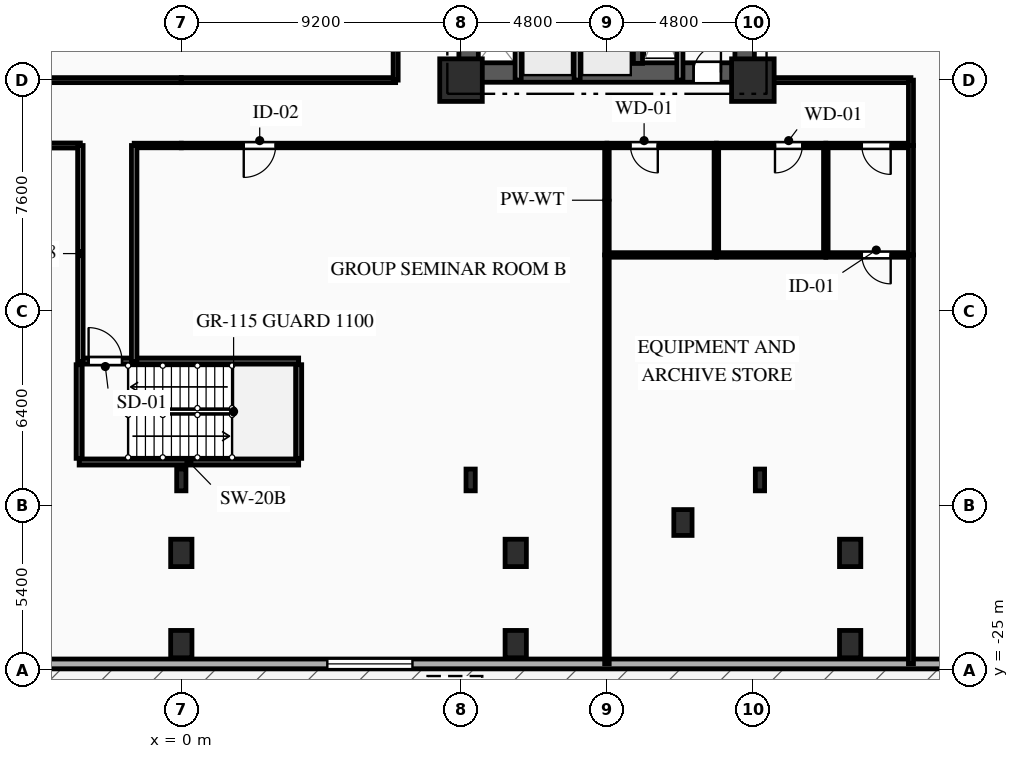
"""IFC4 building model, lengths in metres.
Left out: names, types, materials, properties, quantities, classifications, styles, units other than length and angle.
Written with IfcOpenShell. Run it as: python <this file> out.ifc"""

import sys

from ifc_helpers import new_model, si_unit, direction, frame, frame_2d, origin, origin_2d, place, context, subcontext, project, spatial, rectangle, i_section, extrude, element, fill, save


model = new_model("IFC4")
c1 = context("Model", 3, precision=1e-05, world=origin(), true_north=direction((0.0, 1.0)))
c2 = subcontext(c1, "Body", "Model", "MODEL_VIEW")
j1 = project(units=[si_unit("LENGTHUNIT", "METRE"), si_unit("PLANEANGLEUNIT", "RADIAN")], contexts=[c1])
p1 = place(None, origin())
s1 = spatial("IfcSite", under=j1, at=p1, CompositionType="ELEMENT")
p2 = place(p1, origin())
s2 = spatial("IfcBuilding", under=s1, at=p2, CompositionType="ELEMENT")
p3 = place(p2, frame((0.0, 0.0, 4.5)))
s3 = spatial("IfcBuildingStorey", under=s2, at=p3, CompositionType="ELEMENT", Elevation=4.5)
for number, where, z_axis, x_axis in (
    (1, (9.2, -5.6, 0.0), (0.0, 0.0, 1.0), (1.0, 0.0, 0.0)),
    (2, (18.8, -5.6, 0.0), (0.0, 0.0, 1.0), (1.0, 0.0, 0.0)),
):
    element("IfcColumn", number, at=place(p3, frame(where, z_axis=z_axis, x_axis=x_axis)), inside=s3, PredefinedType="COLUMN", context=c2, shape_type="SweptSolid", body=[
        extrude(rectangle(XDim=1.4, YDim=1.4, at=origin_2d()), origin(), (0.0, 0.0, 1.0), 4.5),
    ])
for number, where, z_axis, x_axis in (
    (3, (0.0, -21.15, 0.0), (0.0, 0.0, 1.0), (1.0, 0.0, 0.0)),
    (4, (11.0, -21.15, 0.0), (0.0, 0.0, 1.0), (1.0, 0.0, 0.0)),
    (5, (22.0, -21.15, 0.0), (0.0, 0.0, 1.0), (1.0, 0.0, 0.0)),
    (6, (0.0, -24.15, 0.0), (0.0, 0.0, 1.0), (1.0, 0.0, 0.0)),
    (7, (11.0, -24.15, 0.0), (0.0, 0.0, 1.0), (1.0, 0.0, 0.0)),
    (8, (22.0, -24.15, 0.0), (0.0, 0.0, 1.0), (1.0, 0.0, 0.0)),
):
    element("IfcColumn", number, at=place(p3, frame(where, z_axis=z_axis, x_axis=x_axis)), inside=s3, PredefinedType="COLUMN", context=c2, shape_type="SweptSolid", body=[
        extrude(rectangle(XDim=0.7, YDim=0.9, at=origin_2d()), origin(), (0.0, 0.0, 1.0), 4.5),
    ])
p4 = place(p3, frame((16.5, -20.15, 0.0), z_axis=(0.0, 0.0, 1.0), x_axis=(1.0, 0.0, 0.0)))
e9 = element("IfcColumn", 9, at=p4, inside=s3, PredefinedType="PILASTER", context=c2, shape_type="SweptSolid", body=[
    extrude(rectangle(XDim=0.6, YDim=0.85, at=origin_2d()), origin(), (0.0, 0.0, 1.0), 4.5),
])
for number, where, z_axis, x_axis in (
    (10, (0.0, -18.75, 0.0), (0.0, 0.0, 1.0), (1.0, 0.0, 0.0)),
    (11, (9.517, -18.75, 0.0), (0.0, 0.0, 1.0), (1.0, 0.0, 0.0)),
    (12, (19.033, -18.75, 0.0), (0.0, 0.0, 1.0), (1.0, 0.0, 0.0)),
):
    element("IfcColumn", number, at=place(p3, frame(where, z_axis=z_axis, x_axis=x_axis)), inside=s3, PredefinedType="COLUMN", context=c2, shape_type="SweptSolid", body=[
        extrude(i_section(OverallWidth=0.304, OverallDepth=0.716, WebThickness=0.021, FlangeThickness=0.04, FilletRadius=0.027, at=origin_2d()), origin(), (0.0, 0.0, 1.0), 4.5),
    ])
p5 = place(p3, frame((38.3, -24.8, 0.0), z_axis=(0.0, 0.0, 1.0), x_axis=(-1.0, 0.0, 0.0)))
e13 = element("IfcWall", 13, at=p5, inside=s3, PredefinedType="SOLIDWALL", context=c2, shape_type="SweptSolid", body=[
    extrude(rectangle(XDim=76.6, YDim=0.32, at=frame_2d((38.3, 0.0))), origin(), (0.0, 0.0, 1.0), 4.17),
])
p6 = place(p5, frame((6.004, 0.0, 0.85)))
e14 = element("IfcOpeningElement", 14, at=p6, cuts=e13, PredefinedType="OPENING", context=c2, shape_type="SweptSolid", body=[
    extrude(rectangle(XDim=2.8, YDim=2.4, at=frame_2d((1.4, 1.2))), frame((0.0, 0.17, 0.0), z_axis=(0.0, -1.0, 0.0), x_axis=(1.0, 0.0, 0.0)), (0.0, 0.0, 1.0), 0.34),
])
p7 = place(p5, frame((30.697, 0.0, 0.85)))
e15 = element("IfcOpeningElement", 15, at=p7, cuts=e13, PredefinedType="OPENING", context=c2, shape_type="SweptSolid", body=[
    extrude(rectangle(XDim=2.8, YDim=2.4, at=frame_2d((1.4, 1.2))), frame((0.0, 0.17, 0.0), z_axis=(0.0, -1.0, 0.0), x_axis=(1.0, 0.0, 0.0)), (0.0, 0.0, 1.0), 0.34),
])
p8 = place(p5, frame((50.587, 0.0, 0.85)))
e16 = element("IfcOpeningElement", 16, at=p8, cuts=e13, PredefinedType="OPENING", context=c2, shape_type="SweptSolid", body=[
    extrude(rectangle(XDim=2.8, YDim=2.4, at=frame_2d((1.4, 1.2))), frame((0.0, 0.17, 0.0), z_axis=(0.0, -1.0, 0.0), x_axis=(1.0, 0.0, 0.0)), (0.0, 0.0, 1.0), 0.34),
])
p9 = place(p5, frame((67.876, 0.0, 0.85)))
e17 = element("IfcOpeningElement", 17, at=p9, cuts=e13, PredefinedType="OPENING", context=c2, shape_type="SweptSolid", body=[
    extrude(rectangle(XDim=2.8, YDim=2.4, at=frame_2d((1.4, 1.2))), frame((0.0, 0.17, 0.0), z_axis=(0.0, -1.0, 0.0), x_axis=(1.0, 0.0, 0.0)), (0.0, 0.0, 1.0), 0.34),
])
p10 = place(p3, frame((9.2, -5.35, 0.0), z_axis=(0.0, 0.0, 1.0), x_axis=(1.0, 0.0, 0.0)))
e18 = element("IfcWall", 18, at=p10, inside=s3, PredefinedType="SHEAR", context=c2, shape_type="SweptSolid", body=[
    extrude(rectangle(XDim=9.6, YDim=0.64, at=frame_2d((4.8, 0.0))), origin(), (0.0, 0.0, 1.0), 4.17),
])
p11 = place(p10, frame((7.65, 0.0, 0.0)))
e19 = element("IfcOpeningElement", 19, at=p11, cuts=e18, PredefinedType="OPENING", context=c2, shape_type="SweptSolid", body=[
    extrude(rectangle(XDim=0.9, YDim=2.1, at=frame_2d((0.45, 1.05))), frame((0.0, 0.33, 0.0), z_axis=(0.0, -1.0, 0.0), x_axis=(1.0, 0.0, 0.0)), (0.0, 0.0, 1.0), 0.66),
])
p12 = place(p3, frame((9.45, -5.05, 0.0), z_axis=(0.0, 0.0, 1.0), x_axis=(0.0, 1.0, 0.0)))
e20 = element("IfcWall", 20, at=p12, inside=s3, PredefinedType="SHEAR", context=c2, shape_type="SweptSolid", body=[
    extrude(rectangle(XDim=10.1, YDim=0.64, at=frame_2d((5.05, 0.0))), origin(), (0.0, 0.0, 1.0), 4.17),
])
p13 = place(p12, frame((7.15, 0.0, 0.0)))
e21 = element("IfcOpeningElement", 21, at=p13, cuts=e20, PredefinedType="OPENING", context=c2, shape_type="SweptSolid", body=[
    extrude(rectangle(XDim=0.9, YDim=2.1, at=frame_2d((0.45, 1.05))), frame((0.0, 0.33, 0.0), z_axis=(0.0, -1.0, 0.0), x_axis=(1.0, 0.0, 0.0)), (0.0, 0.0, 1.0), 0.66),
])
p14 = place(p12, frame((2.4, 0.0, 0.0)))
e22 = element("IfcOpeningElement", 22, at=p14, cuts=e20, PredefinedType="OPENING", context=c2, shape_type="SweptSolid", body=[
    extrude(rectangle(XDim=1.2, YDim=2.15, at=frame_2d((0.6, 1.075))), frame((0.0, 0.33, 0.0), z_axis=(0.0, -1.0, 0.0), x_axis=(1.0, 0.0, 0.0)), (0.0, 0.0, 1.0), 0.66),
])
p15 = place(p3, frame((18.53, -5.05, 0.0), z_axis=(0.0, 0.0, 1.0), x_axis=(0.0, 1.0, 0.0)))
e23 = element("IfcWall", 23, at=p15, inside=s3, PredefinedType="SHEAR", context=c2, shape_type="SweptSolid", body=[
    extrude(rectangle(XDim=10.1, YDim=0.64, at=frame_2d((5.05, 0.0))), origin(), (0.0, 0.0, 1.0), 4.17),
])
p16 = place(p3, frame((15.02, -5.05, 0.0), z_axis=(0.0, 0.0, 1.0), x_axis=(0.0, 1.0, 0.0)))
e24 = element("IfcWall", 24, at=p16, inside=s3, PredefinedType="SHEAR", context=c2, shape_type="SweptSolid", body=[
    extrude(rectangle(XDim=10.1, YDim=0.3, at=frame_2d((5.05, 0.0))), origin(), (0.0, 0.0, 1.0), 4.17),
])
p17 = place(p3, frame((-3.36, -14.84, 0.0), z_axis=(0.0, 0.0, 1.0), x_axis=(1.0, 0.0, 0.0)))
e25 = element("IfcWall", 25, at=p17, inside=s3, PredefinedType="SHEAR", context=c2, shape_type="SweptSolid", body=[
    extrude(rectangle(XDim=7.22, YDim=0.2, at=frame_2d((3.61, 0.0))), origin(), (0.0, 0.0, 1.0), 4.17),
])
p18 = place(p17, frame((0.31, 0.0, 0.0)))
e26 = element("IfcOpeningElement", 26, at=p18, cuts=e25, PredefinedType="OPENING", context=c2, shape_type="SweptSolid", body=[
    extrude(rectangle(XDim=1.1, YDim=2.15, at=frame_2d((0.55, 1.075))), frame((0.0, 0.11, 0.0), z_axis=(0.0, -1.0, 0.0), x_axis=(1.0, 0.0, 0.0)), (0.0, 0.0, 1.0), 0.22),
])
p19 = place(p3, frame((-3.36, -18.16, 0.0), z_axis=(0.0, 0.0, 1.0), x_axis=(1.0, 0.0, 0.0)))
e27 = element("IfcWall", 27, at=p19, inside=s3, PredefinedType="SHEAR", context=c2, shape_type="SweptSolid", body=[
    extrude(rectangle(XDim=7.22, YDim=0.2, at=frame_2d((3.61, 0.0))), origin(), (0.0, 0.0, 1.0), 4.17),
])
for number, where, z_axis, x_axis in (
    (28, (-3.36, -18.04, 0.0), (0.0, 0.0, 1.0), (0.0, 1.0, 0.0)),
    (29, (3.86, -18.04, 0.0), (0.0, 0.0, 1.0), (0.0, 1.0, 0.0)),
):
    element("IfcWall", number, at=place(p3, frame(where, z_axis=z_axis, x_axis=x_axis)), inside=s3, PredefinedType="SHEAR", context=c2, shape_type="SweptSolid", body=[
        extrude(rectangle(XDim=3.08, YDim=0.2, at=frame_2d((1.54, 0.0))), origin(), (0.0, 0.0, 1.0), 4.17),
    ])
p20 = place(p3, frame((16.4, -2.11, 0.0), z_axis=(0.0, 0.0, 1.0), x_axis=(0.0, -1.0, 0.0)))
e30 = element("IfcWall", 30, at=p20, inside=s3, PredefinedType="PARTITIONING", context=c2, shape_type="SweptSolid", body=[
    extrude(rectangle(XDim=3.49, YDim=0.2, at=frame_2d((1.745, 0.0))), origin(), (0.0, 0.0, 1.0), 4.17),
])
for number, where, z_axis, x_axis in (
    (31, (11.08, -5.6, 0.0), (0.0, 0.0, 1.0), (0.0, 1.0, 0.0)),
    (32, (13.02, -5.6, 0.0), (0.0, 0.0, 1.0), (0.0, 1.0, 0.0)),
):
    element("IfcWall", number, at=place(p3, frame(where, z_axis=z_axis, x_axis=x_axis)), inside=s3, PredefinedType="PARTITIONING", context=c2, shape_type="SweptSolid", body=[
        extrude(rectangle(XDim=2.25, YDim=0.2, at=frame_2d((1.125, 0.0))), origin(), (0.0, 0.0, 1.0), 4.17),
    ])
p21 = place(p3, frame((-3.32, -7.75, 0.0), z_axis=(0.0, 0.0, 1.0), x_axis=(-1.0, 0.0, 0.0)))
e33 = element("IfcWall", 33, at=p21, inside=s3, PredefinedType="PARTITIONING", context=c2, shape_type="SweptSolid", body=[
    extrude(rectangle(XDim=20.68, YDim=0.165, at=frame_2d((10.34, 0.0))), origin(), (0.0, 0.0, 1.0), 4.17),
])
p22 = place(p21, frame((9.64, 0.0, 0.0)))
e34 = element("IfcOpeningElement", 34, at=p22, cuts=e33, PredefinedType="OPENING", context=c2, shape_type="SweptSolid", body=[
    extrude(rectangle(XDim=1.4, YDim=2.3, at=frame_2d((0.7, 1.15))), frame((0.0, 0.093, 0.0), z_axis=(0.0, -1.0, 0.0), x_axis=(1.0, 0.0, 0.0)), (0.0, 0.0, 1.0), 0.185),
])
p23 = place(p3, frame((0.0, -7.75, 0.0), z_axis=(0.0, 0.0, 1.0), x_axis=(-1.0, 0.0, 0.0)))
e35 = element("IfcWall", 35, at=p23, inside=s3, PredefinedType="PARTITIONING", context=c2, shape_type="SweptSolid", body=[
    extrude(rectangle(XDim=1.55, YDim=0.15, at=frame_2d((0.775, 0.0))), origin(), (0.0, 0.0, 1.0), 4.17),
])
p24 = place(p3, frame((-7.05, -5.6, 0.0), z_axis=(0.0, 0.0, 1.0), x_axis=(1.0, 0.0, 0.0)))
e36 = element("IfcWall", 36, at=p24, inside=s3, PredefinedType="PARTITIONING", context=c2, shape_type="SweptSolid", body=[
    extrude(rectangle(XDim=7.05, YDim=0.165, at=frame_2d((3.525, 0.0))), origin(), (0.0, 0.0, 1.0), 3.655),
])
p25 = place(p3, frame((14.0, -7.75, 0.0), z_axis=(0.0, 0.0, 1.0), x_axis=(-1.0, 0.0, 0.0)))
e37 = element("IfcWall", 37, at=p25, inside=s3, PredefinedType="PARTITIONING", context=c2, shape_type="SweptSolid", body=[
    extrude(rectangle(XDim=14.0, YDim=0.15, at=frame_2d((7.0, 0.0))), origin(), (0.0, 0.0, 1.0), 4.17),
])
p26 = place(p25, frame((10.896, 0.0, 0.0)))
e38 = element("IfcOpeningElement", 38, at=p26, cuts=e37, PredefinedType="OPENING", context=c2, shape_type="SweptSolid", body=[
    extrude(rectangle(XDim=1.05, YDim=2.15, at=frame_2d((0.525, 1.075))), frame((0.0, 0.085, 0.0), z_axis=(0.0, -1.0, 0.0), x_axis=(1.0, 0.0, 0.0)), (0.0, 0.0, 1.0), 0.17),
])
p27 = place(p3, frame((17.6, -7.75, 0.0), z_axis=(0.0, 0.0, 1.0), x_axis=(-1.0, 0.0, 0.0)))
e39 = element("IfcWall", 39, at=p27, inside=s3, PredefinedType="PLUMBINGWALL", context=c2, shape_type="SweptSolid", body=[
    extrude(rectangle(XDim=3.6, YDim=0.15, at=frame_2d((1.8, 0.0))), origin(), (0.0, 0.0, 1.0), 4.17),
])
p28 = place(p27, frame((1.927, 0.0, 0.0)))
e40 = element("IfcOpeningElement", 40, at=p28, cuts=e39, PredefinedType="OPENING", context=c2, shape_type="SweptSolid", body=[
    extrude(rectangle(XDim=0.9, YDim=2.1, at=frame_2d((0.45, 1.05))), frame((0.0, 0.085, 0.0), z_axis=(0.0, -1.0, 0.0), x_axis=(1.0, 0.0, 0.0)), (0.0, 0.0, 1.0), 0.17),
])
p29 = place(p3, frame((21.2, -7.75, 0.0), z_axis=(0.0, 0.0, 1.0), x_axis=(-1.0, 0.0, 0.0)))
e41 = element("IfcWall", 41, at=p29, inside=s3, PredefinedType="PLUMBINGWALL", context=c2, shape_type="SweptSolid", body=[
    extrude(rectangle(XDim=3.6, YDim=0.15, at=frame_2d((1.8, 0.0))), origin(), (0.0, 0.0, 1.0), 4.17),
])
p30 = place(p29, frame((0.772, 0.0, 0.0)))
e42 = element("IfcOpeningElement", 42, at=p30, cuts=e41, PredefinedType="OPENING", context=c2, shape_type="SweptSolid", body=[
    extrude(rectangle(XDim=0.9, YDim=2.1, at=frame_2d((0.45, 1.05))), frame((0.0, 0.085, 0.0), z_axis=(0.0, -1.0, 0.0), x_axis=(1.0, 0.0, 0.0)), (0.0, 0.0, 1.0), 0.17),
])
p31 = place(p3, frame((24.0, -7.75, 0.0), z_axis=(0.0, 0.0, 1.0), x_axis=(-1.0, 0.0, 0.0)))
e43 = element("IfcWall", 43, at=p31, inside=s3, PredefinedType="PARTITIONING", context=c2, shape_type="SweptSolid", body=[
    extrude(rectangle(XDim=2.8, YDim=0.15, at=frame_2d((1.4, 0.0))), origin(), (0.0, 0.0, 1.0), 4.17),
])
p32 = place(p31, frame((0.666, 0.0, 0.0)))
e44 = element("IfcOpeningElement", 44, at=p32, cuts=e43, PredefinedType="OPENING", context=c2, shape_type="SweptSolid", body=[
    extrude(rectangle(XDim=0.95, YDim=2.1, at=frame_2d((0.475, 1.05))), frame((0.0, 0.085, 0.0), z_axis=(0.0, -1.0, 0.0), x_axis=(1.0, 0.0, 0.0)), (0.0, 0.0, 1.0), 0.17),
])
p33 = place(p3, frame((0.0, -5.6, 0.0), z_axis=(0.0, 0.0, 1.0), x_axis=(1.0, 0.0, 0.0)))
e45 = element("IfcWall", 45, at=p33, inside=s3, PredefinedType="PARTITIONING", context=c2, shape_type="SweptSolid", body=[
    extrude(rectangle(XDim=7.05, YDim=0.165, at=frame_2d((3.525, 0.0))), origin(), (0.0, 0.0, 1.0), 3.655),
])
p34 = place(p3, frame((18.8, -5.6, 0.0), z_axis=(0.0, 0.0, 1.0), x_axis=(1.0, 0.0, 0.0)))
e46 = element("IfcWall", 46, at=p34, inside=s3, PredefinedType="PARTITIONING", context=c2, shape_type="SweptSolid", body=[
    extrude(rectangle(XDim=5.2, YDim=0.165, at=frame_2d((2.6, 0.0))), origin(), (0.0, 0.0, 1.0), 4.17),
])
p35 = place(p3, frame((24.0, -5.6, 0.0), z_axis=(0.0, 0.0, 1.0), x_axis=(0.0, -1.0, 0.0)))
e47 = element("IfcWall", 47, at=p35, inside=s3, PredefinedType="PARTITIONING", context=c2, shape_type="SweptSolid", body=[
    extrude(rectangle(XDim=2.15, YDim=0.165, at=frame_2d((1.075, 0.0))), origin(), (0.0, 0.0, 1.0), 4.17),
])
p36 = place(p3, frame((7.05, -5.6, 0.0), z_axis=(0.0, 0.0, 1.0), x_axis=(0.0, 1.0, 0.0)))
e48 = element("IfcWall", 48, at=p36, inside=s3, PredefinedType="PARTITIONING", context=c2, shape_type="SweptSolid", body=[
    extrude(rectangle(XDim=14.1, YDim=0.165, at=frame_2d((7.05, 0.0))), origin(), (0.0, 0.0, 1.0), 4.17),
])
for number, where, z_axis, x_axis in (
    (49, (-3.32, -14.86, 0.0), (0.0, 0.0, 1.0), (0.0, 1.0, 0.0)),
    (50, (-1.55, -7.75, 0.0), (0.0, 0.0, 1.0), (0.0, -1.0, 0.0)),
):
    element("IfcWall", number, at=place(p3, frame(where, z_axis=z_axis, x_axis=x_axis)), inside=s3, PredefinedType="PARTITIONING", context=c2, shape_type="SweptSolid", body=[
        extrude(rectangle(XDim=7.11, YDim=0.18, at=frame_2d((3.555, 0.0))), origin(), (0.0, 0.0, 1.0), 4.17),
    ])
p37 = place(p3, frame((14.0, -7.75, 0.0), z_axis=(0.0, 0.0, 1.0), x_axis=(0.0, -1.0, 0.0)))
e51 = element("IfcWall", 51, at=p37, inside=s3, PredefinedType="PLUMBINGWALL", context=c2, shape_type="SweptSolid", body=[
    extrude(rectangle(XDim=3.6, YDim=0.15, at=frame_2d((1.8, 0.0))), origin(), (0.0, 0.0, 1.0), 4.17),
])
p38 = place(p3, frame((14.0, -11.35, 0.0), z_axis=(0.0, 0.0, 1.0), x_axis=(0.0, -1.0, 0.0)))
e52 = element("IfcWall", 52, at=p38, inside=s3, PredefinedType="PARTITIONING", context=c2, shape_type="SweptSolid", body=[
    extrude(rectangle(XDim=13.45, YDim=0.15, at=frame_2d((6.725, 0.0))), origin(), (0.0, 0.0, 1.0), 4.17),
])
for number, where, z_axis, x_axis in (
    (53, (17.6, -7.75, 0.0), (0.0, 0.0, 1.0), (0.0, -1.0, 0.0)),
    (54, (17.6, -11.35, 0.0), (0.0, 0.0, 1.0), (-1.0, 0.0, 0.0)),
    (55, (21.2, -7.75, 0.0), (0.0, 0.0, 1.0), (0.0, -1.0, 0.0)),
):
    element("IfcWall", number, at=place(p3, frame(where, z_axis=z_axis, x_axis=x_axis)), inside=s3, PredefinedType="PLUMBINGWALL", context=c2, shape_type="SweptSolid", body=[
        extrude(rectangle(XDim=3.6, YDim=0.15, at=frame_2d((1.8, 0.0))), origin(), (0.0, 0.0, 1.0), 4.17),
    ])
p39 = place(p3, frame((21.2, -11.35, 0.0), z_axis=(0.0, 0.0, 1.0), x_axis=(-1.0, 0.0, 0.0)))
e56 = element("IfcWall", 56, at=p39, inside=s3, PredefinedType="PLUMBINGWALL", context=c2, shape_type="SweptSolid", body=[
    extrude(rectangle(XDim=3.6, YDim=0.15, at=frame_2d((1.8, 0.0))), origin(), (0.0, 0.0, 1.0), 4.17),
])
p40 = place(p3, frame((24.0, -11.35, 0.0), z_axis=(0.0, 0.0, 1.0), x_axis=(-1.0, 0.0, 0.0)))
e57 = element("IfcWall", 57, at=p40, inside=s3, PredefinedType="PARTITIONING", context=c2, shape_type="SweptSolid", body=[
    extrude(rectangle(XDim=2.8, YDim=0.15, at=frame_2d((1.4, 0.0))), origin(), (0.0, 0.0, 1.0), 4.17),
])
p41 = place(p40, frame((0.666, 0.0, 0.0)))
e58 = element("IfcOpeningElement", 58, at=p41, cuts=e57, PredefinedType="OPENING", context=c2, shape_type="SweptSolid", body=[
    extrude(rectangle(XDim=0.95, YDim=2.1, at=frame_2d((0.475, 1.05))), frame((0.0, 0.085, 0.0), z_axis=(0.0, -1.0, 0.0), x_axis=(1.0, 0.0, 0.0)), (0.0, 0.0, 1.0), 0.17),
])
p42 = place(p3, frame((24.0, -7.75, 0.0), z_axis=(0.0, 0.0, 1.0), x_axis=(0.0, -1.0, 0.0)))
e59 = element("IfcWall", 59, at=p42, inside=s3, PredefinedType="PARTITIONING", context=c2, shape_type="SweptSolid", body=[
    extrude(rectangle(XDim=3.6, YDim=0.165, at=frame_2d((1.8, 0.0))), origin(), (0.0, 0.0, 1.0), 4.17),
])
p43 = place(p3, frame((24.0, -11.35, 0.0), z_axis=(0.0, 0.0, 1.0), x_axis=(0.0, -1.0, 0.0)))
e60 = element("IfcWall", 60, at=p43, inside=s3, PredefinedType="PARTITIONING", context=c2, shape_type="SweptSolid", body=[
    extrude(rectangle(XDim=13.45, YDim=0.165, at=frame_2d((6.725, 0.0))), origin(), (0.0, 0.0, 1.0), 4.17),
])
p44 = place(p7, origin())
e61 = element("IfcWindow", 61, at=p44, inside=s3, PartitioningType="SINGLE_PANEL", PredefinedType="WINDOW", context=c2, shape_type="SweptSolid", body=[
    extrude(rectangle(XDim=2.8, YDim=2.4, at=frame_2d((1.4, 1.2))), frame((0.0, 0.03, 0.0), z_axis=(0.0, -1.0, 0.0), x_axis=(1.0, 0.0, 0.0)), (0.0, 0.0, 1.0), 0.06),
])
fill(e15, e61)
p45 = place(p3, frame((0.0, 0.0, -0.24)))
p46 = place(p45, frame((9.0, -26.1, 0.0)))
p47 = place(p46, frame((0.0, 0.0, 0.19)))
e62 = element("IfcWindow", 62, at=p47, inside=s3, PartitioningType="SINGLE_PANEL", PredefinedType="SKYLIGHT", context=c2, shape_type="SweptSolid", body=[
    extrude(rectangle(XDim=1.8, YDim=1.8, at=origin_2d()), origin(), (0.0, 0.0, 1.0), 0.05),
])
p48 = place(p11, origin())
e63 = element("IfcDoor", 63, at=p48, inside=s3, OperationType="SINGLE_SWING_RIGHT", PredefinedType="DOOR", context=c2, shape_type="SweptSolid", body=[
    extrude(rectangle(XDim=0.9, YDim=2.1, at=frame_2d((0.45, 1.05))), frame((0.0, 0.025, 0.0), z_axis=(0.0, -1.0, 0.0), x_axis=(1.0, 0.0, 0.0)), (0.0, 0.0, 1.0), 0.05),
])
fill(e19, e63)
p49 = place(p18, origin())
e64 = element("IfcDoor", 64, at=p49, inside=s3, OperationType="SINGLE_SWING_LEFT", PredefinedType="DOOR", context=c2, shape_type="SweptSolid", body=[
    extrude(rectangle(XDim=1.1, YDim=2.15, at=frame_2d((0.55, 1.075))), frame((0.0, 0.025, 0.0), z_axis=(0.0, -1.0, 0.0), x_axis=(1.0, 0.0, 0.0)), (0.0, 0.0, 1.0), 0.05),
])
fill(e26, e64)
p50 = place(p26, origin())
e65 = element("IfcDoor", 65, at=p50, inside=s3, OperationType="SINGLE_SWING_RIGHT", PredefinedType="DOOR", context=c2, shape_type="SweptSolid", body=[
    extrude(rectangle(XDim=1.05, YDim=2.15, at=frame_2d((0.525, 1.075))), frame((0.0, 0.025, 0.0), z_axis=(0.0, -1.0, 0.0), x_axis=(1.0, 0.0, 0.0)), (0.0, 0.0, 1.0), 0.05),
])
fill(e38, e65)
p51 = place(p28, origin())
e66 = element("IfcDoor", 66, at=p51, inside=s3, OperationType="SINGLE_SWING_LEFT", PredefinedType="DOOR", context=c2, shape_type="SweptSolid", body=[
    extrude(rectangle(XDim=0.9, YDim=2.1, at=frame_2d((0.45, 1.05))), frame((0.0, 0.025, 0.0), z_axis=(0.0, -1.0, 0.0), x_axis=(1.0, 0.0, 0.0)), (0.0, 0.0, 1.0), 0.05),
])
fill(e40, e66)
p52 = place(p30, origin())
e67 = element("IfcDoor", 67, at=p52, inside=s3, OperationType="SINGLE_SWING_RIGHT", PredefinedType="DOOR", context=c2, shape_type="SweptSolid", body=[
    extrude(rectangle(XDim=0.9, YDim=2.1, at=frame_2d((0.45, 1.05))), frame((0.0, 0.025, 0.0), z_axis=(0.0, -1.0, 0.0), x_axis=(1.0, 0.0, 0.0)), (0.0, 0.0, 1.0), 0.05),
])
fill(e42, e67)
p53 = place(p32, origin())
e68 = element("IfcDoor", 68, at=p53, inside=s3, OperationType="SINGLE_SWING_LEFT", PredefinedType="DOOR", context=c2, shape_type="SweptSolid", body=[
    extrude(rectangle(XDim=0.95, YDim=2.1, at=frame_2d((0.475, 1.05))), frame((0.0, 0.025, 0.0), z_axis=(0.0, -1.0, 0.0), x_axis=(1.0, 0.0, 0.0)), (0.0, 0.0, 1.0), 0.05),
])
fill(e44, e68)
p54 = place(p41, origin())
e69 = element("IfcDoor", 69, at=p54, inside=s3, OperationType="SINGLE_SWING_LEFT", PredefinedType="DOOR", context=c2, shape_type="SweptSolid", body=[
    extrude(rectangle(XDim=0.95, YDim=2.1, at=frame_2d((0.475, 1.05))), frame((0.0, 0.025, 0.0), z_axis=(0.0, -1.0, 0.0), x_axis=(1.0, 0.0, 0.0)), (0.0, 0.0, 1.0), 0.05),
])
fill(e58, e69)
save(model, sys.argv[1])
